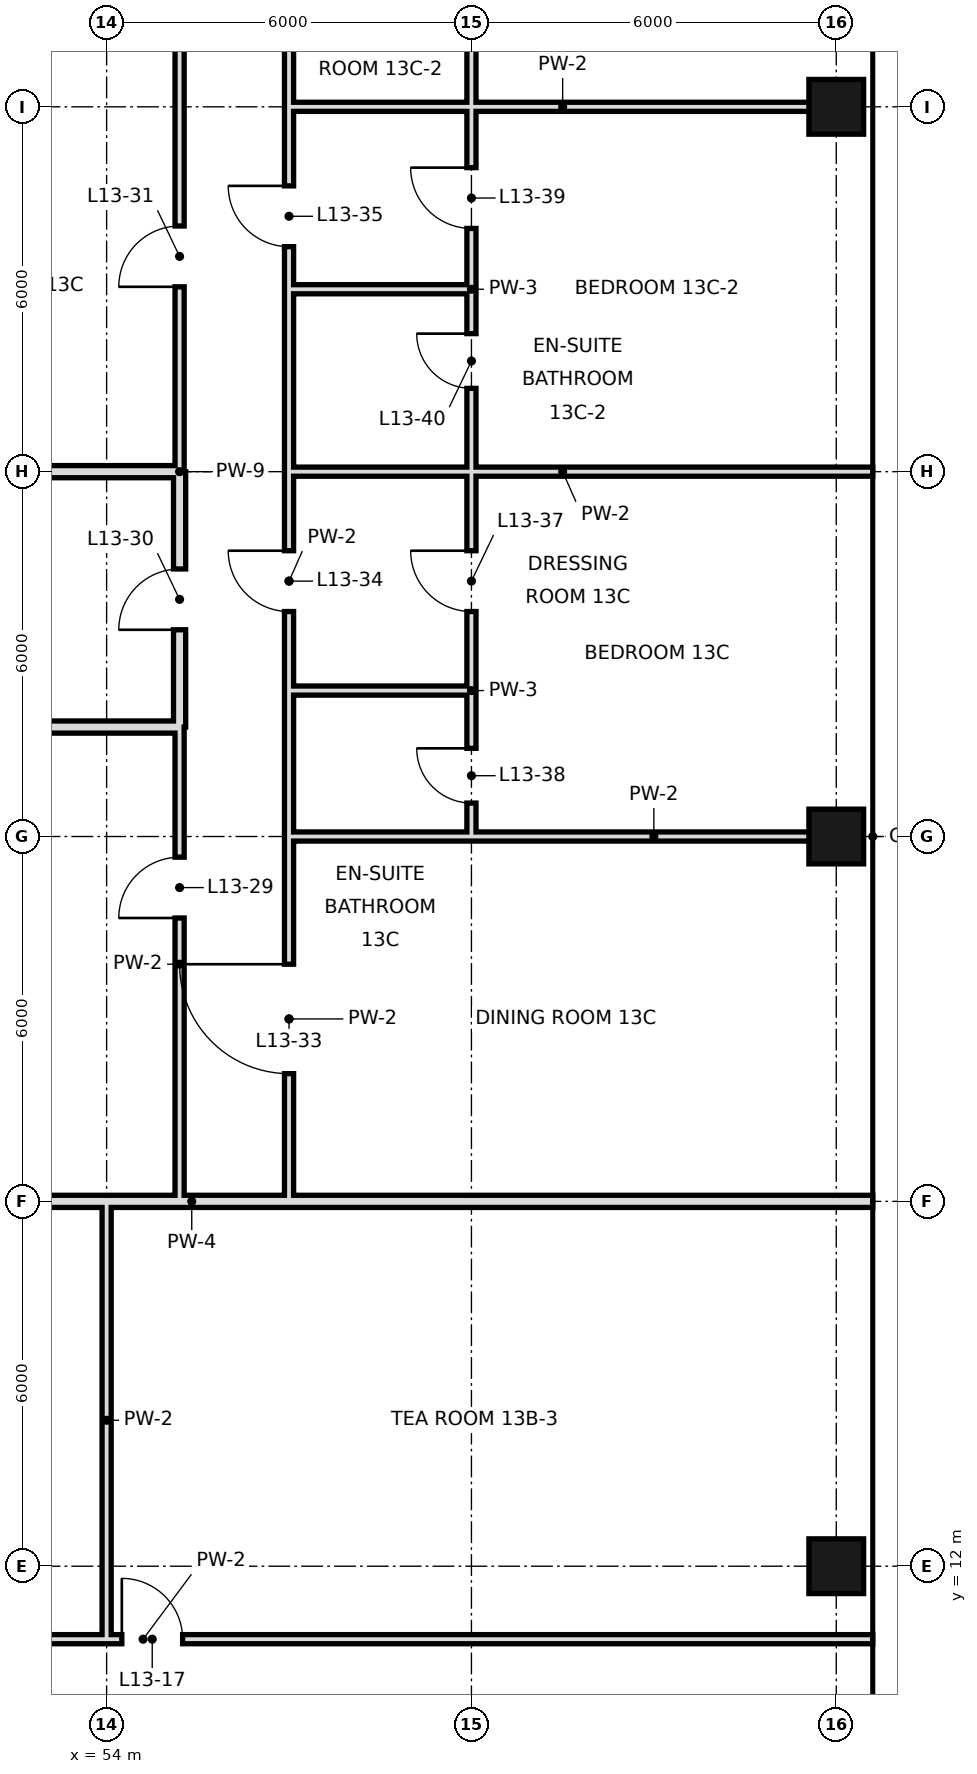
"""IFC4 building model, lengths in metres.
Left out: names, types, materials, properties, quantities, classifications, styles, units other than length and angle.
Written with IfcOpenShell. Run it as: python <this file> out.ifc"""

import sys

from ifc_helpers import new_model, si_unit, direction, frame, frame_2d, origin, origin_2d, place, context, subcontext, project, spatial, rectangle, hollow_rectangle, extrude, element, fill, save


model = new_model("IFC4")
c1 = context("Model", 3, precision=1e-05, world=origin(), true_north=direction((0.0, 1.0)))
c2 = subcontext(c1, "Body", "Model", "MODEL_VIEW")
j1 = project(units=[si_unit("LENGTHUNIT", "METRE"), si_unit("PLANEANGLEUNIT", "RADIAN")], contexts=[c1])
p1 = place(None, origin())
s1 = spatial("IfcSite", under=j1, at=p1, CompositionType="ELEMENT")
p2 = place(p1, origin())
s2 = spatial("IfcBuilding", under=s1, at=p2, CompositionType="ELEMENT")
p3 = place(p2, frame((0.0, 0.0, 67.8)))
s3 = spatial("IfcBuildingStorey", under=s2, at=p3, CompositionType="ELEMENT", Elevation=67.8)
for number, where, z_axis, x_axis in (
    (1, (66.0, 12.0, 0.0), (0.0, 0.0, 1.0), (1.0, 0.0, 0.0)),
    (2, (66.0, 24.0, 0.0), (0.0, 0.0, 1.0), (1.0, 0.0, 0.0)),
    (3, (66.0, 36.0, 0.0), (0.0, 0.0, 1.0), (1.0, 0.0, 0.0)),
):
    element("IfcColumn", number, at=place(p3, frame(where, z_axis=z_axis, x_axis=x_axis)), inside=s3, PredefinedType="COLUMN", context=c2, shape_type="SweptSolid", body=[
        extrude(hollow_rectangle(XDim=0.9, YDim=0.9, WallThickness=0.045, at=origin_2d()), origin(), (0.0, 0.0, 1.0), 3.6),
    ])
p4 = place(p3, frame((54.0, 10.8, 0.0), z_axis=(0.0, 0.0, 1.0), x_axis=(0.0, 1.0, 0.0)))
e4 = element("IfcWall", 4, at=p4, inside=s3, PredefinedType="PARTITIONING", context=c2, shape_type="SweptSolid", body=[
    extrude(rectangle(XDim=7.2, YDim=0.15, at=frame_2d((3.6, 0.0))), origin(), (0.0, 0.0, 1.0), 3.42),
])
p5 = place(p3, frame((55.2, 25.8, 0.0), z_axis=(0.0, 0.0, 1.0), x_axis=(0.0, 1.0, 0.0)))
e5 = element("IfcWall", 5, at=p5, inside=s3, PredefinedType="SOLIDWALL", context=c2, shape_type="SweptSolid", body=[
    extrude(rectangle(XDim=4.2, YDim=0.2, at=frame_2d((2.1, 0.0))), origin(), (0.0, 0.0, 1.0), 2.52),
])
p6 = place(p5, frame((1.6, 0.0, 0.0)))
e6 = element("IfcOpeningElement", 6, at=p6, cuts=e5, PredefinedType="OPENING", context=c2, shape_type="SweptSolid", body=[
    extrude(rectangle(XDim=1.0, YDim=2.4, at=frame_2d((0.5, 1.2))), frame((0.0, 0.11, 0.0), z_axis=(0.0, -1.0, 0.0), x_axis=(1.0, 0.0, 0.0)), (0.0, 0.0, 1.0), 0.22),
])
p7 = place(p3, frame((55.2, 18.0, 0.0), z_axis=(0.0, 0.0, 1.0), x_axis=(0.0, 1.0, 0.0)))
e7 = element("IfcWall", 7, at=p7, inside=s3, PredefinedType="PARTITIONING", context=c2, shape_type="SweptSolid", body=[
    extrude(rectangle(XDim=7.8, YDim=0.15, at=frame_2d((3.9, 0.0))), origin(), (0.0, 0.0, 1.0), 3.42),
])
p8 = place(p7, frame((4.66, 0.0, 0.0)))
e8 = element("IfcOpeningElement", 8, at=p8, cuts=e7, PredefinedType="OPENING", context=c2, shape_type="SweptSolid", body=[
    extrude(rectangle(XDim=1.0, YDim=2.4, at=frame_2d((0.5, 1.2))), frame((0.0, 0.085, 0.0), z_axis=(0.0, -1.0, 0.0), x_axis=(1.0, 0.0, 0.0)), (0.0, 0.0, 1.0), 0.17),
])
p9 = place(p3, frame((55.2, 30.0, 0.0), z_axis=(0.0, 0.0, 1.0), x_axis=(0.0, 1.0, 0.0)))
e9 = element("IfcWall", 9, at=p9, inside=s3, PredefinedType="PARTITIONING", context=c2, shape_type="SweptSolid", body=[
    extrude(rectangle(XDim=15.6, YDim=0.15, at=frame_2d((7.8, 0.0))), origin(), (0.0, 0.0, 1.0), 3.42),
])
p10 = place(p9, frame((12.7, 0.0, 0.0)))
e10 = element("IfcOpeningElement", 10, at=p10, cuts=e9, PredefinedType="OPENING", context=c2, shape_type="SweptSolid", body=[
    extrude(rectangle(XDim=1.0, YDim=2.4, at=frame_2d((0.5, 1.2))), frame((0.0, 0.085, 0.0), z_axis=(0.0, -1.0, 0.0), x_axis=(1.0, 0.0, 0.0)), (0.0, 0.0, 1.0), 0.17),
])
p11 = place(p9, frame((3.04, 0.0, 0.0)))
e11 = element("IfcOpeningElement", 11, at=p11, cuts=e9, PredefinedType="OPENING", context=c2, shape_type="SweptSolid", body=[
    extrude(rectangle(XDim=1.0, YDim=2.4, at=frame_2d((0.5, 1.2))), frame((0.0, 0.085, 0.0), z_axis=(0.0, -1.0, 0.0), x_axis=(1.0, 0.0, 0.0)), (0.0, 0.0, 1.0), 0.17),
])
p12 = place(p3, frame((57.0, 18.0, 0.0), z_axis=(0.0, 0.0, 1.0), x_axis=(0.0, 1.0, 0.0)))
e12 = element("IfcWall", 12, at=p12, inside=s3, PredefinedType="PARTITIONING", context=c2, shape_type="SweptSolid", body=[
    extrude(rectangle(XDim=6.0, YDim=0.15, at=frame_2d((3.0, 0.0))), origin(), (0.0, 0.0, 1.0), 3.42),
])
p13 = place(p12, frame((2.1, 0.0, 0.0)))
e13 = element("IfcOpeningElement", 13, at=p13, cuts=e12, PredefinedType="OPENING", context=c2, shape_type="SweptSolid", body=[
    extrude(rectangle(XDim=1.8, YDim=2.4, at=frame_2d((0.9, 1.2))), frame((0.0, 0.085, 0.0), z_axis=(0.0, -1.0, 0.0), x_axis=(1.0, 0.0, 0.0)), (0.0, 0.0, 1.0), 0.17),
])
p14 = place(p3, frame((57.0, 26.4, 0.0), z_axis=(0.0, 0.0, 1.0), x_axis=(0.0, 1.0, 0.0)))
e14 = element("IfcWall", 14, at=p14, inside=s3, PredefinedType="PARTITIONING", context=c2, shape_type="SweptSolid", body=[
    extrude(rectangle(XDim=3.6, YDim=0.15, at=frame_2d((1.8, 0.0))), origin(), (0.0, 0.0, 1.0), 3.42),
])
p15 = place(p14, frame((1.3, 0.0, 0.0)))
e15 = element("IfcOpeningElement", 15, at=p15, cuts=e14, PredefinedType="OPENING", context=c2, shape_type="SweptSolid", body=[
    extrude(rectangle(XDim=1.0, YDim=2.4, at=frame_2d((0.5, 1.2))), frame((0.0, 0.085, 0.0), z_axis=(0.0, -1.0, 0.0), x_axis=(1.0, 0.0, 0.0)), (0.0, 0.0, 1.0), 0.17),
])
p16 = place(p3, frame((57.0, 33.0, 0.0), z_axis=(0.0, 0.0, 1.0), x_axis=(0.0, 1.0, 0.0)))
e16 = element("IfcWall", 16, at=p16, inside=s3, PredefinedType="PARTITIONING", context=c2, shape_type="SweptSolid", body=[
    extrude(rectangle(XDim=15.6, YDim=0.15, at=frame_2d((7.8, 0.0))), origin(), (0.0, 0.0, 1.0), 3.42),
])
p17 = place(p16, frame((0.7, 0.0, 0.0)))
e17 = element("IfcOpeningElement", 17, at=p17, cuts=e16, PredefinedType="OPENING", context=c2, shape_type="SweptSolid", body=[
    extrude(rectangle(XDim=1.0, YDim=2.4, at=frame_2d((0.5, 1.2))), frame((0.0, 0.085, 0.0), z_axis=(0.0, -1.0, 0.0), x_axis=(1.0, 0.0, 0.0)), (0.0, 0.0, 1.0), 0.17),
])
p18 = place(p16, frame((10.04, 0.0, 0.0)))
e18 = element("IfcOpeningElement", 18, at=p18, cuts=e16, PredefinedType="OPENING", context=c2, shape_type="SweptSolid", body=[
    extrude(rectangle(XDim=1.8, YDim=2.4, at=frame_2d((0.9, 1.2))), frame((0.0, 0.085, 0.0), z_axis=(0.0, -1.0, 0.0), x_axis=(1.0, 0.0, 0.0)), (0.0, 0.0, 1.0), 0.17),
])
p19 = place(p3, frame((57.0, 24.0, 0.0), z_axis=(0.0, 0.0, 1.0), x_axis=(0.0, 1.0, 0.0)))
e19 = element("IfcWall", 19, at=p19, inside=s3, PredefinedType="PARTITIONING", context=c2, shape_type="SweptSolid", body=[
    extrude(rectangle(XDim=2.4, YDim=0.15, at=frame_2d((1.2, 0.0))), origin(), (0.0, 0.0, 1.0), 3.42),
])
p20 = place(p3, frame((57.0, 30.0, 0.0), z_axis=(0.0, 0.0, 1.0), x_axis=(0.0, 1.0, 0.0)))
e20 = element("IfcWall", 20, at=p20, inside=s3, PredefinedType="PARTITIONING", context=c2, shape_type="SweptSolid", body=[
    extrude(rectangle(XDim=3.0, YDim=0.15, at=frame_2d((1.5, 0.0))), origin(), (0.0, 0.0, 1.0), 3.42),
])
p21 = place(p3, frame((60.0, 26.4, 0.0), z_axis=(0.0, 0.0, 1.0), x_axis=(0.0, 1.0, 0.0)))
e21 = element("IfcWall", 21, at=p21, inside=s3, PredefinedType="PARTITIONING", context=c2, shape_type="SweptSolid", body=[
    extrude(rectangle(XDim=3.6, YDim=0.15, at=frame_2d((1.8, 0.0))), origin(), (0.0, 0.0, 1.0), 3.42),
])
p22 = place(p21, frame((1.3, 0.0, 0.0)))
e22 = element("IfcOpeningElement", 22, at=p22, cuts=e21, PredefinedType="OPENING", context=c2, shape_type="SweptSolid", body=[
    extrude(rectangle(XDim=1.0, YDim=2.4, at=frame_2d((0.5, 1.2))), frame((0.0, 0.085, 0.0), z_axis=(0.0, -1.0, 0.0), x_axis=(1.0, 0.0, 0.0)), (0.0, 0.0, 1.0), 0.17),
])
p23 = place(p3, frame((60.0, 33.0, 0.0), z_axis=(0.0, 0.0, 1.0), x_axis=(0.0, 1.0, 0.0)))
e23 = element("IfcWall", 23, at=p23, inside=s3, PredefinedType="PARTITIONING", context=c2, shape_type="SweptSolid", body=[
    extrude(rectangle(XDim=15.0, YDim=0.15, at=frame_2d((7.5, 0.0))), origin(), (0.0, 0.0, 1.0), 3.42),
])
p24 = place(p23, frame((1.0, 0.0, 0.0)))
e24 = element("IfcOpeningElement", 24, at=p24, cuts=e23, PredefinedType="OPENING", context=c2, shape_type="SweptSolid", body=[
    extrude(rectangle(XDim=1.0, YDim=2.4, at=frame_2d((0.5, 1.2))), frame((0.0, 0.085, 0.0), z_axis=(0.0, -1.0, 0.0), x_axis=(1.0, 0.0, 0.0)), (0.0, 0.0, 1.0), 0.17),
])
p25 = place(p23, frame((10.04, 0.0, 0.0)))
e25 = element("IfcOpeningElement", 25, at=p25, cuts=e23, PredefinedType="OPENING", context=c2, shape_type="SweptSolid", body=[
    extrude(rectangle(XDim=1.8, YDim=2.4, at=frame_2d((0.9, 1.2))), frame((0.0, 0.085, 0.0), z_axis=(0.0, -1.0, 0.0), x_axis=(1.0, 0.0, 0.0)), (0.0, 0.0, 1.0), 0.17),
])
p26 = place(p3, frame((60.0, 24.0, 0.0), z_axis=(0.0, 0.0, 1.0), x_axis=(0.0, 1.0, 0.0)))
e26 = element("IfcWall", 26, at=p26, inside=s3, PredefinedType="PARTITIONING", context=c2, shape_type="SweptSolid", body=[
    extrude(rectangle(XDim=2.4, YDim=0.15, at=frame_2d((1.2, 0.0))), origin(), (0.0, 0.0, 1.0), 3.42),
])
p27 = place(p26, frame((0.55, 0.0, 0.0)))
e27 = element("IfcOpeningElement", 27, at=p27, cuts=e26, PredefinedType="OPENING", context=c2, shape_type="SweptSolid", body=[
    extrude(rectangle(XDim=0.9, YDim=2.4, at=frame_2d((0.45, 1.2))), frame((0.0, 0.085, 0.0), z_axis=(0.0, -1.0, 0.0), x_axis=(1.0, 0.0, 0.0)), (0.0, 0.0, 1.0), 0.17),
])
p28 = place(p3, frame((60.0, 30.0, 0.0), z_axis=(0.0, 0.0, 1.0), x_axis=(0.0, 1.0, 0.0)))
e28 = element("IfcWall", 28, at=p28, inside=s3, PredefinedType="PARTITIONING", context=c2, shape_type="SweptSolid", body=[
    extrude(rectangle(XDim=3.0, YDim=0.15, at=frame_2d((1.5, 0.0))), origin(), (0.0, 0.0, 1.0), 3.42),
])
p29 = place(p28, frame((1.37, 0.0, 0.0)))
e29 = element("IfcOpeningElement", 29, at=p29, cuts=e28, PredefinedType="OPENING", context=c2, shape_type="SweptSolid", body=[
    extrude(rectangle(XDim=0.9, YDim=2.4, at=frame_2d((0.45, 1.2))), frame((0.0, 0.085, 0.0), z_axis=(0.0, -1.0, 0.0), x_axis=(1.0, 0.0, 0.0)), (0.0, 0.0, 1.0), 0.17),
])
p30 = place(p3, frame((42.6, 10.8, 0.0), z_axis=(0.0, 0.0, 1.0), x_axis=(1.0, 0.0, 0.0)))
e30 = element("IfcWall", 30, at=p30, inside=s3, PredefinedType="PARTITIONING", context=c2, shape_type="SweptSolid", body=[
    extrude(rectangle(XDim=24.0, YDim=0.15, at=frame_2d((12.0, 0.0))), origin(), (0.0, 0.0, 1.0), 3.42),
])
p31 = place(p30, frame((7.18, 0.0, 0.0)))
e31 = element("IfcOpeningElement", 31, at=p31, cuts=e30, PredefinedType="OPENING", context=c2, shape_type="SweptSolid", body=[
    extrude(rectangle(XDim=1.0, YDim=2.4, at=frame_2d((0.5, 1.2))), frame((0.0, 0.085, 0.0), z_axis=(0.0, -1.0, 0.0), x_axis=(1.0, 0.0, 0.0)), (0.0, 0.0, 1.0), 0.17),
])
p32 = place(p30, frame((11.65, 0.0, 0.0)))
e32 = element("IfcOpeningElement", 32, at=p32, cuts=e30, PredefinedType="OPENING", context=c2, shape_type="SweptSolid", body=[
    extrude(rectangle(XDim=1.0, YDim=2.4, at=frame_2d((0.5, 1.2))), frame((0.0, 0.085, 0.0), z_axis=(0.0, -1.0, 0.0), x_axis=(1.0, 0.0, 0.0)), (0.0, 0.0, 1.0), 0.17),
])
p33 = place(p3, frame((44.9, 18.0, 0.0), z_axis=(0.0, 0.0, 1.0), x_axis=(1.0, 0.0, 0.0)))
e33 = element("IfcWall", 33, at=p33, inside=s3, PredefinedType="SOLIDWALL", context=c2, shape_type="SweptSolid", body=[
    extrude(rectangle(XDim=21.7, YDim=0.2, at=frame_2d((10.85, 0.0))), origin(), (0.0, 0.0, 1.0), 2.52),
])
p34 = place(p3, frame((60.0, 24.0, 0.0), z_axis=(0.0, 0.0, 1.0), x_axis=(1.0, 0.0, 0.0)))
e34 = element("IfcWall", 34, at=p34, inside=s3, PredefinedType="PARTITIONING", context=c2, shape_type="SweptSolid", body=[
    extrude(rectangle(XDim=6.0, YDim=0.15, at=frame_2d((3.0, 0.0))), origin(), (0.0, 0.0, 1.0), 2.52),
])
p35 = place(p3, frame((57.0, 24.0, 0.0), z_axis=(0.0, 0.0, 1.0), x_axis=(1.0, 0.0, 0.0)))
e35 = element("IfcWall", 35, at=p35, inside=s3, PredefinedType="PARTITIONING", context=c2, shape_type="SweptSolid", body=[
    extrude(rectangle(XDim=3.0, YDim=0.15, at=frame_2d((1.5, 0.0))), origin(), (0.0, 0.0, 1.0), 2.52),
])
p36 = place(p3, frame((44.9, 25.8, 0.0), z_axis=(0.0, 0.0, 1.0), x_axis=(1.0, 0.0, 0.0)))
e36 = element("IfcWall", 36, at=p36, inside=s3, PredefinedType="SOLIDWALL", context=c2, shape_type="SweptSolid", body=[
    extrude(rectangle(XDim=10.3, YDim=0.2, at=frame_2d((5.15, 0.0))), origin(), (0.0, 0.0, 1.0), 2.97),
])
p37 = place(p3, frame((57.0, 26.4, 0.0), z_axis=(0.0, 0.0, 1.0), x_axis=(1.0, 0.0, 0.0)))
e37 = element("IfcWall", 37, at=p37, inside=s3, PredefinedType="PARTITIONING", context=c2, shape_type="SweptSolid", body=[
    extrude(rectangle(XDim=3.0, YDim=0.15, at=frame_2d((1.5, 0.0))), origin(), (0.0, 0.0, 1.0), 3.42),
])
p38 = place(p3, frame((44.9, 30.0, 0.0), z_axis=(0.0, 0.0, 1.0), x_axis=(1.0, 0.0, 0.0)))
e38 = element("IfcWall", 38, at=p38, inside=s3, PredefinedType="SOLIDWALL", context=c2, shape_type="SweptSolid", body=[
    extrude(rectangle(XDim=10.3, YDim=0.2, at=frame_2d((5.15, 0.0))), origin(), (0.0, 0.0, 1.0), 2.52),
])
p39 = place(p3, frame((60.0, 30.0, 0.0), z_axis=(0.0, 0.0, 1.0), x_axis=(1.0, 0.0, 0.0)))
e39 = element("IfcWall", 39, at=p39, inside=s3, PredefinedType="PARTITIONING", context=c2, shape_type="SweptSolid", body=[
    extrude(rectangle(XDim=6.6, YDim=0.15, at=frame_2d((3.3, 0.0))), origin(), (0.0, 0.0, 1.0), 2.52),
])
p40 = place(p3, frame((57.0, 30.0, 0.0), z_axis=(0.0, 0.0, 1.0), x_axis=(1.0, 0.0, 0.0)))
e40 = element("IfcWall", 40, at=p40, inside=s3, PredefinedType="PARTITIONING", context=c2, shape_type="SweptSolid", body=[
    extrude(rectangle(XDim=3.0, YDim=0.15, at=frame_2d((1.5, 0.0))), origin(), (0.0, 0.0, 1.0), 2.52),
])
p41 = place(p3, frame((57.0, 33.0, 0.0), z_axis=(0.0, 0.0, 1.0), x_axis=(1.0, 0.0, 0.0)))
e41 = element("IfcWall", 41, at=p41, inside=s3, PredefinedType="PARTITIONING", context=c2, shape_type="SweptSolid", body=[
    extrude(rectangle(XDim=3.0, YDim=0.15, at=frame_2d((1.5, 0.0))), origin(), (0.0, 0.0, 1.0), 3.42),
])
p42 = place(p3, frame((57.0, 36.0, 0.0), z_axis=(0.0, 0.0, 1.0), x_axis=(1.0, 0.0, 0.0)))
e42 = element("IfcWall", 42, at=p42, inside=s3, PredefinedType="PARTITIONING", context=c2, shape_type="SweptSolid", body=[
    extrude(rectangle(XDim=9.0, YDim=0.15, at=frame_2d((4.5, 0.0))), origin(), (0.0, 0.0, 1.0), 2.52),
])
p43 = place(p32, origin())
e43 = element("IfcDoor", 43, at=p43, inside=s3, OperationType="SINGLE_SWING_LEFT", PredefinedType="DOOR", context=c2, shape_type="SweptSolid", body=[
    extrude(rectangle(XDim=1.0, YDim=2.4, at=frame_2d((0.5, 1.2))), frame((0.0, 0.025, 0.0), z_axis=(0.0, -1.0, 0.0), x_axis=(1.0, 0.0, 0.0)), (0.0, 0.0, 1.0), 0.05),
])
fill(e32, e43)
p44 = place(p8, origin())
e44 = element("IfcDoor", 44, at=p44, inside=s3, OperationType="SINGLE_SWING_LEFT", PredefinedType="DOOR", context=c2, shape_type="SweptSolid", body=[
    extrude(rectangle(XDim=1.0, YDim=2.4, at=frame_2d((0.5, 1.2))), frame((0.0, 0.025, 0.0), z_axis=(0.0, -1.0, 0.0), x_axis=(1.0, 0.0, 0.0)), (0.0, 0.0, 1.0), 0.05),
])
fill(e8, e44)
p45 = place(p6, origin())
e45 = element("IfcDoor", 45, at=p45, inside=s3, OperationType="SINGLE_SWING_LEFT", PredefinedType="DOOR", context=c2, shape_type="SweptSolid", body=[
    extrude(rectangle(XDim=1.0, YDim=2.4, at=frame_2d((0.5, 1.2))), frame((0.0, 0.025, 0.0), z_axis=(0.0, -1.0, 0.0), x_axis=(1.0, 0.0, 0.0)), (0.0, 0.0, 1.0), 0.05),
])
fill(e6, e45)
p46 = place(p11, origin())
e46 = element("IfcDoor", 46, at=p46, inside=s3, OperationType="SINGLE_SWING_LEFT", PredefinedType="DOOR", context=c2, shape_type="SweptSolid", body=[
    extrude(rectangle(XDim=1.0, YDim=2.4, at=frame_2d((0.5, 1.2))), frame((0.0, 0.025, 0.0), z_axis=(0.0, -1.0, 0.0), x_axis=(1.0, 0.0, 0.0)), (0.0, 0.0, 1.0), 0.05),
])
fill(e11, e46)
p47 = place(p13, frame((1.8, 0.0, 0.0), z_axis=(0.0, 0.0, 1.0), x_axis=(-1.0, 0.0, 0.0)))
e47 = element("IfcDoor", 47, at=p47, inside=s3, OperationType="SINGLE_SWING_LEFT", PredefinedType="DOOR", context=c2, shape_type="SweptSolid", body=[
    extrude(rectangle(XDim=1.8, YDim=2.4, at=frame_2d((0.9, 1.2))), frame((0.0, 0.025, 0.0), z_axis=(0.0, -1.0, 0.0), x_axis=(1.0, 0.0, 0.0)), (0.0, 0.0, 1.0), 0.05),
])
fill(e13, e47)
p48 = place(p15, frame((1.0, 0.0, 0.0), z_axis=(0.0, 0.0, 1.0), x_axis=(-1.0, 0.0, 0.0)))
e48 = element("IfcDoor", 48, at=p48, inside=s3, OperationType="SINGLE_SWING_LEFT", PredefinedType="DOOR", context=c2, shape_type="SweptSolid", body=[
    extrude(rectangle(XDim=1.0, YDim=2.4, at=frame_2d((0.5, 1.2))), frame((0.0, 0.025, 0.0), z_axis=(0.0, -1.0, 0.0), x_axis=(1.0, 0.0, 0.0)), (0.0, 0.0, 1.0), 0.05),
])
fill(e15, e48)
p49 = place(p17, frame((1.0, 0.0, 0.0), z_axis=(0.0, 0.0, 1.0), x_axis=(-1.0, 0.0, 0.0)))
e49 = element("IfcDoor", 49, at=p49, inside=s3, OperationType="SINGLE_SWING_LEFT", PredefinedType="DOOR", context=c2, shape_type="SweptSolid", body=[
    extrude(rectangle(XDim=1.0, YDim=2.4, at=frame_2d((0.5, 1.2))), frame((0.0, 0.025, 0.0), z_axis=(0.0, -1.0, 0.0), x_axis=(1.0, 0.0, 0.0)), (0.0, 0.0, 1.0), 0.05),
])
fill(e17, e49)
p50 = place(p22, frame((1.0, 0.0, 0.0), z_axis=(0.0, 0.0, 1.0), x_axis=(-1.0, 0.0, 0.0)))
e50 = element("IfcDoor", 50, at=p50, inside=s3, OperationType="SINGLE_SWING_LEFT", PredefinedType="DOOR", context=c2, shape_type="SweptSolid", body=[
    extrude(rectangle(XDim=1.0, YDim=2.4, at=frame_2d((0.5, 1.2))), frame((0.0, 0.025, 0.0), z_axis=(0.0, -1.0, 0.0), x_axis=(1.0, 0.0, 0.0)), (0.0, 0.0, 1.0), 0.05),
])
fill(e22, e50)
p51 = place(p27, frame((0.9, 0.0, 0.0), z_axis=(0.0, 0.0, 1.0), x_axis=(-1.0, 0.0, 0.0)))
e51 = element("IfcDoor", 51, at=p51, inside=s3, OperationType="SINGLE_SWING_LEFT", PredefinedType="DOOR", context=c2, shape_type="SweptSolid", body=[
    extrude(rectangle(XDim=0.9, YDim=2.4, at=frame_2d((0.45, 1.2))), frame((0.0, 0.025, 0.0), z_axis=(0.0, -1.0, 0.0), x_axis=(1.0, 0.0, 0.0)), (0.0, 0.0, 1.0), 0.05),
])
fill(e27, e51)
p52 = place(p24, frame((1.0, 0.0, 0.0), z_axis=(0.0, 0.0, 1.0), x_axis=(-1.0, 0.0, 0.0)))
e52 = element("IfcDoor", 52, at=p52, inside=s3, OperationType="SINGLE_SWING_LEFT", PredefinedType="DOOR", context=c2, shape_type="SweptSolid", body=[
    extrude(rectangle(XDim=1.0, YDim=2.4, at=frame_2d((0.5, 1.2))), frame((0.0, 0.025, 0.0), z_axis=(0.0, -1.0, 0.0), x_axis=(1.0, 0.0, 0.0)), (0.0, 0.0, 1.0), 0.05),
])
fill(e24, e52)
p53 = place(p29, frame((0.9, 0.0, 0.0), z_axis=(0.0, 0.0, 1.0), x_axis=(-1.0, 0.0, 0.0)))
e53 = element("IfcDoor", 53, at=p53, inside=s3, OperationType="SINGLE_SWING_LEFT", PredefinedType="DOOR", context=c2, shape_type="SweptSolid", body=[
    extrude(rectangle(XDim=0.9, YDim=2.4, at=frame_2d((0.45, 1.2))), frame((0.0, 0.025, 0.0), z_axis=(0.0, -1.0, 0.0), x_axis=(1.0, 0.0, 0.0)), (0.0, 0.0, 1.0), 0.05),
])
fill(e29, e53)
save(model, sys.argv[1])
